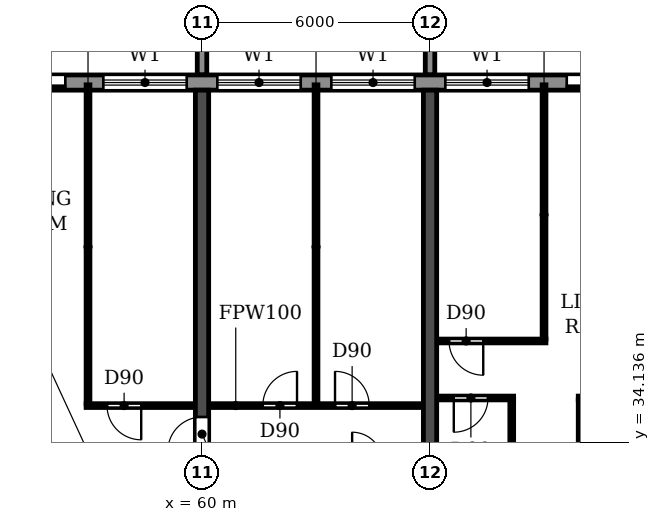
"""IFC4 building model, lengths in metres.
Left out: names, types, materials, properties, quantities, classifications, styles, units other than length and angle.
Written with IfcOpenShell. Run it as: python <this file> out.ifc"""

import sys

from ifc_helpers import new_model, si_unit, direction, frame, frame_2d, origin, place, context, subcontext, project, spatial, polyline, rectangle, outline, extrude, source, transform, mapped, element, fill, save


model = new_model("IFC4")
c1 = context("Model", 3, precision=1e-05, world=origin(), true_north=direction((0.0, 1.0)))
c2 = subcontext(c1, "Body", "Model", "MODEL_VIEW")
j1 = project(units=[si_unit("LENGTHUNIT", "METRE"), si_unit("PLANEANGLEUNIT", "RADIAN")], contexts=[c1])
p1 = place(None, origin())
s1 = spatial("IfcSite", under=j1, at=p1, CompositionType="ELEMENT")
p2 = place(p1, origin())
s2 = spatial("IfcBuilding", under=s1, at=p2, CompositionType="ELEMENT")
p3 = place(p2, frame((0.0, 0.0, 92.7)))
s3 = spatial("IfcBuildingStorey", under=s2, at=p3, CompositionType="ELEMENT", Elevation=92.7)
p4 = place(p3, frame((60.0, 30.525, 0.0), z_axis=(0.0, 0.0, 1.0), x_axis=(0.0, 1.0, 0.0)))
e1 = element("IfcWall", 1, at=p4, inside=s3, PredefinedType="SHEAR", context=c2, shape_type="SweptSolid", body=[
    extrude(rectangle(XDim=12.875, YDim=0.35, at=frame_2d((6.438, 0.0))), origin(), (0.0, 0.0, 1.0), 3.06),
])
p5 = place(p4, frame((3.375, 0.0, 0.0)))
e2 = element("IfcOpeningElement", 2, at=p5, cuts=e1, PredefinedType="OPENING", context=c2, shape_type="SweptSolid", body=[
    extrude(rectangle(XDim=0.9, YDim=2.1, at=frame_2d((0.45, 1.05))), frame((0.0, 0.185, 0.0), z_axis=(0.0, -1.0, 0.0), x_axis=(1.0, 0.0, 0.0)), (0.0, 0.0, 1.0), 0.37),
])
p6 = place(p3, frame((66.0, 30.525, 0.0), z_axis=(0.0, 0.0, 1.0), x_axis=(0.0, 1.0, 0.0)))
e3 = element("IfcWall", 3, at=p6, inside=s3, PredefinedType="SHEAR", context=c2, shape_type="SweptSolid", body=[
    extrude(rectangle(XDim=12.875, YDim=0.35, at=frame_2d((6.438, 0.0))), origin(), (0.0, 0.0, 1.0), 3.06),
])
p7 = place(p3, frame((91.317, 43.6, 0.0), z_axis=(0.0, 0.0, 1.0), x_axis=(-1.0, 0.0, 0.0)))
e4 = element("IfcWall", 4, at=p7, inside=s3, PredefinedType="STANDARD", context=c2, shape_type="SweptSolid", body=[
    extrude(rectangle(XDim=80.634, YDim=0.4, at=frame_2d((40.317, 0.0))), origin(), (0.0, 0.0, 1.0), 3.06),
])
p8 = place(p7, frame((76.717, 0.0, 0.9)))
e5 = element("IfcOpeningElement", 5, at=p8, cuts=e4, PredefinedType="OPENING", context=c2, shape_type="SweptSolid", body=[
    extrude(rectangle(XDim=2.2, YDim=1.5, at=frame_2d((1.1, 0.75))), frame((0.0, 0.21, 0.0), z_axis=(0.0, -1.0, 0.0), x_axis=(1.0, 0.0, 0.0)), (0.0, 0.0, 1.0), 0.42),
])
p9 = place(p7, frame((73.917, 0.0, 0.0)))
e6 = element("IfcOpeningElement", 6, at=p9, cuts=e4, PredefinedType="OPENING", context=c2, shape_type="SweptSolid", body=[
    extrude(rectangle(XDim=1.8, YDim=2.4, at=frame_2d((0.9, 1.2))), frame((0.0, 0.21, 0.0), z_axis=(0.0, -1.0, 0.0), x_axis=(1.0, 0.0, 0.0)), (0.0, 0.0, 1.0), 0.42),
])
p10 = place(p7, frame((70.717, 0.0, 0.9)))
e7 = element("IfcOpeningElement", 7, at=p10, cuts=e4, PredefinedType="OPENING", context=c2, shape_type="SweptSolid", body=[
    extrude(rectangle(XDim=2.2, YDim=1.5, at=frame_2d((1.1, 0.75))), frame((0.0, 0.21, 0.0), z_axis=(0.0, -1.0, 0.0), x_axis=(1.0, 0.0, 0.0)), (0.0, 0.0, 1.0), 0.42),
])
p11 = place(p7, frame((67.717, 0.0, 0.9)))
e8 = element("IfcOpeningElement", 8, at=p11, cuts=e4, PredefinedType="OPENING", context=c2, shape_type="SweptSolid", body=[
    extrude(rectangle(XDim=2.2, YDim=1.5, at=frame_2d((1.1, 0.75))), frame((0.0, 0.21, 0.0), z_axis=(0.0, -1.0, 0.0), x_axis=(1.0, 0.0, 0.0)), (0.0, 0.0, 1.0), 0.42),
])
p12 = place(p7, frame((64.717, 0.0, 0.9)))
e9 = element("IfcOpeningElement", 9, at=p12, cuts=e4, PredefinedType="OPENING", context=c2, shape_type="SweptSolid", body=[
    extrude(rectangle(XDim=2.2, YDim=1.5, at=frame_2d((1.1, 0.75))), frame((0.0, 0.21, 0.0), z_axis=(0.0, -1.0, 0.0), x_axis=(1.0, 0.0, 0.0)), (0.0, 0.0, 1.0), 0.42),
])
p13 = place(p7, frame((61.917, 0.0, 0.0)))
e10 = element("IfcOpeningElement", 10, at=p13, cuts=e4, PredefinedType="OPENING", context=c2, shape_type="SweptSolid", body=[
    extrude(rectangle(XDim=1.8, YDim=2.4, at=frame_2d((0.9, 1.2))), frame((0.0, 0.21, 0.0), z_axis=(0.0, -1.0, 0.0), x_axis=(1.0, 0.0, 0.0)), (0.0, 0.0, 1.0), 0.42),
])
p14 = place(p7, frame((58.717, 0.0, 0.9)))
e11 = element("IfcOpeningElement", 11, at=p14, cuts=e4, PredefinedType="OPENING", context=c2, shape_type="SweptSolid", body=[
    extrude(rectangle(XDim=2.2, YDim=1.5, at=frame_2d((1.1, 0.75))), frame((0.0, 0.21, 0.0), z_axis=(0.0, -1.0, 0.0), x_axis=(1.0, 0.0, 0.0)), (0.0, 0.0, 1.0), 0.42),
])
p15 = place(p7, frame((55.717, 0.0, 0.9)))
e12 = element("IfcOpeningElement", 12, at=p15, cuts=e4, PredefinedType="OPENING", context=c2, shape_type="SweptSolid", body=[
    extrude(rectangle(XDim=2.2, YDim=1.5, at=frame_2d((1.1, 0.75))), frame((0.0, 0.21, 0.0), z_axis=(0.0, -1.0, 0.0), x_axis=(1.0, 0.0, 0.0)), (0.0, 0.0, 1.0), 0.42),
])
p16 = place(p7, frame((52.917, 0.0, 0.0)))
e13 = element("IfcOpeningElement", 13, at=p16, cuts=e4, PredefinedType="OPENING", context=c2, shape_type="SweptSolid", body=[
    extrude(rectangle(XDim=1.8, YDim=2.4, at=frame_2d((0.9, 1.2))), frame((0.0, 0.21, 0.0), z_axis=(0.0, -1.0, 0.0), x_axis=(1.0, 0.0, 0.0)), (0.0, 0.0, 1.0), 0.42),
])
p17 = place(p7, frame((49.717, 0.0, 0.9)))
e14 = element("IfcOpeningElement", 14, at=p17, cuts=e4, PredefinedType="OPENING", context=c2, shape_type="SweptSolid", body=[
    extrude(rectangle(XDim=2.2, YDim=1.5, at=frame_2d((1.1, 0.75))), frame((0.0, 0.21, 0.0), z_axis=(0.0, -1.0, 0.0), x_axis=(1.0, 0.0, 0.0)), (0.0, 0.0, 1.0), 0.42),
])
p18 = place(p7, frame((46.717, 0.0, 0.9)))
e15 = element("IfcOpeningElement", 15, at=p18, cuts=e4, PredefinedType="OPENING", context=c2, shape_type="SweptSolid", body=[
    extrude(rectangle(XDim=2.2, YDim=1.5, at=frame_2d((1.1, 0.75))), frame((0.0, 0.21, 0.0), z_axis=(0.0, -1.0, 0.0), x_axis=(1.0, 0.0, 0.0)), (0.0, 0.0, 1.0), 0.42),
])
p19 = place(p7, frame((43.717, 0.0, 0.9)))
e16 = element("IfcOpeningElement", 16, at=p19, cuts=e4, PredefinedType="OPENING", context=c2, shape_type="SweptSolid", body=[
    extrude(rectangle(XDim=2.2, YDim=1.5, at=frame_2d((1.1, 0.75))), frame((0.0, 0.21, 0.0), z_axis=(0.0, -1.0, 0.0), x_axis=(1.0, 0.0, 0.0)), (0.0, 0.0, 1.0), 0.42),
])
p20 = place(p7, frame((40.717, 0.0, 0.9)))
e17 = element("IfcOpeningElement", 17, at=p20, cuts=e4, PredefinedType="OPENING", context=c2, shape_type="SweptSolid", body=[
    extrude(rectangle(XDim=2.2, YDim=1.5, at=frame_2d((1.1, 0.75))), frame((0.0, 0.21, 0.0), z_axis=(0.0, -1.0, 0.0), x_axis=(1.0, 0.0, 0.0)), (0.0, 0.0, 1.0), 0.42),
])
p21 = place(p7, frame((37.917, 0.0, 0.0)))
e18 = element("IfcOpeningElement", 18, at=p21, cuts=e4, PredefinedType="OPENING", context=c2, shape_type="SweptSolid", body=[
    extrude(rectangle(XDim=1.8, YDim=2.4, at=frame_2d((0.9, 1.2))), frame((0.0, 0.21, 0.0), z_axis=(0.0, -1.0, 0.0), x_axis=(1.0, 0.0, 0.0)), (0.0, 0.0, 1.0), 0.42),
])
p22 = place(p7, frame((34.917, 0.0, 0.0)))
e19 = element("IfcOpeningElement", 19, at=p22, cuts=e4, PredefinedType="OPENING", context=c2, shape_type="SweptSolid", body=[
    extrude(rectangle(XDim=1.8, YDim=2.4, at=frame_2d((0.9, 1.2))), frame((0.0, 0.21, 0.0), z_axis=(0.0, -1.0, 0.0), x_axis=(1.0, 0.0, 0.0)), (0.0, 0.0, 1.0), 0.42),
])
p23 = place(p7, frame((31.717, 0.0, 0.9)))
e20 = element("IfcOpeningElement", 20, at=p23, cuts=e4, PredefinedType="OPENING", context=c2, shape_type="SweptSolid", body=[
    extrude(rectangle(XDim=2.2, YDim=1.5, at=frame_2d((1.1, 0.75))), frame((0.0, 0.21, 0.0), z_axis=(0.0, -1.0, 0.0), x_axis=(1.0, 0.0, 0.0)), (0.0, 0.0, 1.0), 0.42),
])
p24 = place(p7, frame((28.717, 0.0, 0.9)))
e21 = element("IfcOpeningElement", 21, at=p24, cuts=e4, PredefinedType="OPENING", context=c2, shape_type="SweptSolid", body=[
    extrude(rectangle(XDim=2.2, YDim=1.5, at=frame_2d((1.1, 0.75))), frame((0.0, 0.21, 0.0), z_axis=(0.0, -1.0, 0.0), x_axis=(1.0, 0.0, 0.0)), (0.0, 0.0, 1.0), 0.42),
])
p25 = place(p7, frame((25.717, 0.0, 0.9)))
e22 = element("IfcOpeningElement", 22, at=p25, cuts=e4, PredefinedType="OPENING", context=c2, shape_type="SweptSolid", body=[
    extrude(rectangle(XDim=2.2, YDim=1.5, at=frame_2d((1.1, 0.75))), frame((0.0, 0.21, 0.0), z_axis=(0.0, -1.0, 0.0), x_axis=(1.0, 0.0, 0.0)), (0.0, 0.0, 1.0), 0.42),
])
p26 = place(p7, frame((22.717, 0.0, 0.9)))
e23 = element("IfcOpeningElement", 23, at=p26, cuts=e4, PredefinedType="OPENING", context=c2, shape_type="SweptSolid", body=[
    extrude(rectangle(XDim=2.2, YDim=1.5, at=frame_2d((1.1, 0.75))), frame((0.0, 0.21, 0.0), z_axis=(0.0, -1.0, 0.0), x_axis=(1.0, 0.0, 0.0)), (0.0, 0.0, 1.0), 0.42),
])
p27 = place(p7, frame((19.917, 0.0, 0.0)))
e24 = element("IfcOpeningElement", 24, at=p27, cuts=e4, PredefinedType="OPENING", context=c2, shape_type="SweptSolid", body=[
    extrude(rectangle(XDim=1.8, YDim=2.4, at=frame_2d((0.9, 1.2))), frame((0.0, 0.21, 0.0), z_axis=(0.0, -1.0, 0.0), x_axis=(1.0, 0.0, 0.0)), (0.0, 0.0, 1.0), 0.42),
])
p28 = place(p7, frame((16.717, 0.0, 0.9)))
e25 = element("IfcOpeningElement", 25, at=p28, cuts=e4, PredefinedType="OPENING", context=c2, shape_type="SweptSolid", body=[
    extrude(rectangle(XDim=2.2, YDim=1.5, at=frame_2d((1.1, 0.75))), frame((0.0, 0.21, 0.0), z_axis=(0.0, -1.0, 0.0), x_axis=(1.0, 0.0, 0.0)), (0.0, 0.0, 1.0), 0.42),
])
p29 = place(p7, frame((13.917, 0.0, 0.0)))
e26 = element("IfcOpeningElement", 26, at=p29, cuts=e4, PredefinedType="OPENING", context=c2, shape_type="SweptSolid", body=[
    extrude(rectangle(XDim=1.8, YDim=2.4, at=frame_2d((0.9, 1.2))), frame((0.0, 0.21, 0.0), z_axis=(0.0, -1.0, 0.0), x_axis=(1.0, 0.0, 0.0)), (0.0, 0.0, 1.0), 0.42),
])
p30 = place(p7, frame((10.717, 0.0, 0.9)))
e27 = element("IfcOpeningElement", 27, at=p30, cuts=e4, PredefinedType="OPENING", context=c2, shape_type="SweptSolid", body=[
    extrude(rectangle(XDim=2.2, YDim=1.5, at=frame_2d((1.1, 0.75))), frame((0.0, 0.21, 0.0), z_axis=(0.0, -1.0, 0.0), x_axis=(1.0, 0.0, 0.0)), (0.0, 0.0, 1.0), 0.42),
])
p31 = place(p7, frame((7.917, 0.0, 0.0)))
e28 = element("IfcOpeningElement", 28, at=p31, cuts=e4, PredefinedType="OPENING", context=c2, shape_type="SweptSolid", body=[
    extrude(rectangle(XDim=1.8, YDim=2.4, at=frame_2d((0.9, 1.2))), frame((0.0, 0.21, 0.0), z_axis=(0.0, -1.0, 0.0), x_axis=(1.0, 0.0, 0.0)), (0.0, 0.0, 1.0), 0.42),
])
p32 = place(p7, frame((4.717, 0.0, 0.9)))
e29 = element("IfcOpeningElement", 29, at=p32, cuts=e4, PredefinedType="OPENING", context=c2, shape_type="SweptSolid", body=[
    extrude(rectangle(XDim=2.2, YDim=1.5, at=frame_2d((1.1, 0.75))), frame((0.0, 0.21, 0.0), z_axis=(0.0, -1.0, 0.0), x_axis=(1.0, 0.0, 0.0)), (0.0, 0.0, 1.0), 0.42),
])
p33 = place(p7, frame((1.917, 0.0, 0.0)))
e30 = element("IfcOpeningElement", 30, at=p33, cuts=e4, PredefinedType="OPENING", context=c2, shape_type="SweptSolid", body=[
    extrude(rectangle(XDim=1.8, YDim=2.4, at=frame_2d((0.9, 1.2))), frame((0.0, 0.21, 0.0), z_axis=(0.0, -1.0, 0.0), x_axis=(1.0, 0.0, 0.0)), (0.0, 0.0, 1.0), 0.42),
])
m1 = source(origin(), c2, "Body", "SweptSolid", [
    extrude(outline(polyline([(0.0, 0.0), (0.25, 0.0), (0.25, 3.1), (0.0, 3.1), (0.0, 0.0)])), origin(), (0.0, 0.0, 1.0), 3.1),
])
for number, where in (
    (31, (59.875, 43.8, 0.0)),
    (32, (65.875, 43.8, 0.0)),
):
    element("IfcWall", number, at=place(p3, frame(where)), inside=s3, PredefinedType="STANDARD", context=c2, shape_type="MappedRepresentation", body=[
        mapped(m1, transform((0.0, 0.0, 0.0))),
    ])
p34 = place(p3, frame((56.95, 35.1, 0.0), z_axis=(0.0, 0.0, 1.0), x_axis=(1.0, 0.0, 0.0)))
e33 = element("IfcWall", 33, at=p34, inside=s3, PredefinedType="PARTITIONING", context=c2, shape_type="SweptSolid", body=[
    extrude(rectangle(XDim=2.865, YDim=0.1, at=frame_2d((1.433, 0.0))), origin(), (0.0, 0.0, 1.0), 3.06),
])
p35 = place(p34, frame((0.55, 0.0, 0.0)))
e34 = element("IfcOpeningElement", 34, at=p35, cuts=e33, PredefinedType="OPENING", context=c2, shape_type="SweptSolid", body=[
    extrude(rectangle(XDim=0.9, YDim=2.1, at=frame_2d((0.45, 1.05))), frame((0.0, 0.06, 0.0), z_axis=(0.0, -1.0, 0.0), x_axis=(1.0, 0.0, 0.0)), (0.0, 0.0, 1.0), 0.12),
])
p36 = place(p3, frame((60.185, 35.1, 0.0), z_axis=(0.0, 0.0, 1.0), x_axis=(1.0, 0.0, 0.0)))
e35 = element("IfcWall", 35, at=p36, inside=s3, PredefinedType="PARTITIONING", context=c2, shape_type="SweptSolid", body=[
    extrude(rectangle(XDim=5.63, YDim=0.1, at=frame_2d((2.815, 0.0))), origin(), (0.0, 0.0, 1.0), 3.06),
])
p37 = place(p36, frame((1.415, 0.0, 0.0)))
e36 = element("IfcOpeningElement", 36, at=p37, cuts=e35, PredefinedType="OPENING", context=c2, shape_type="SweptSolid", body=[
    extrude(rectangle(XDim=0.9, YDim=2.1, at=frame_2d((0.45, 1.05))), frame((0.0, 0.06, 0.0), z_axis=(0.0, -1.0, 0.0), x_axis=(1.0, 0.0, 0.0)), (0.0, 0.0, 1.0), 0.12),
])
p38 = place(p36, frame((3.315, 0.0, 0.0)))
e37 = element("IfcOpeningElement", 37, at=p38, cuts=e35, PredefinedType="OPENING", context=c2, shape_type="SweptSolid", body=[
    extrude(rectangle(XDim=0.9, YDim=2.1, at=frame_2d((0.45, 1.05))), frame((0.0, 0.06, 0.0), z_axis=(0.0, -1.0, 0.0), x_axis=(1.0, 0.0, 0.0)), (0.0, 0.0, 1.0), 0.12),
])
p39 = place(p3, frame((66.185, 35.3, 0.0), z_axis=(0.0, 0.0, 1.0), x_axis=(1.0, 0.0, 0.0)))
e38 = element("IfcWall", 38, at=p39, inside=s3, PredefinedType="PARTITIONING", context=c2, shape_type="SweptSolid", body=[
    extrude(rectangle(XDim=2.015, YDim=0.1, at=frame_2d((1.007, 0.0))), origin(), (0.0, 0.0, 1.0), 3.06),
])
p40 = place(p39, frame((0.44, 0.0, 0.0)))
e39 = element("IfcOpeningElement", 39, at=p40, cuts=e38, PredefinedType="OPENING", context=c2, shape_type="SweptSolid", body=[
    extrude(rectangle(XDim=0.9, YDim=2.1, at=frame_2d((0.45, 1.05))), frame((0.0, 0.06, 0.0), z_axis=(0.0, -1.0, 0.0), x_axis=(1.0, 0.0, 0.0)), (0.0, 0.0, 1.0), 0.12),
])
p41 = place(p3, frame((69.9, 35.3, 0.0), z_axis=(0.0, 0.0, 1.0), x_axis=(1.0, 0.0, 0.0)))
e40 = element("IfcWall", 40, at=p41, inside=s3, PredefinedType="PARTITIONING", context=c2, shape_type="SweptSolid", body=[
    extrude(rectangle(XDim=1.915, YDim=0.1, at=frame_2d((0.958, 0.0))), origin(), (0.0, 0.0, 1.0), 3.06),
])
p42 = place(p41, frame((0.675, 0.0, 0.0)))
e41 = element("IfcOpeningElement", 41, at=p42, cuts=e40, PredefinedType="OPENING", context=c2, shape_type="SweptSolid", body=[
    extrude(rectangle(XDim=0.8, YDim=2.1, at=frame_2d((0.4, 1.05))), frame((0.0, 0.06, 0.0), z_axis=(0.0, -1.0, 0.0), x_axis=(1.0, 0.0, 0.0)), (0.0, 0.0, 1.0), 0.12),
])
p43 = place(p3, frame((66.185, 36.8, 0.0), z_axis=(0.0, 0.0, 1.0), x_axis=(1.0, 0.0, 0.0)))
e42 = element("IfcWall", 42, at=p43, inside=s3, PredefinedType="PARTITIONING", context=c2, shape_type="SweptSolid", body=[
    extrude(rectangle(XDim=2.865, YDim=0.1, at=frame_2d((1.433, 0.0))), origin(), (0.0, 0.0, 1.0), 3.06),
])
p44 = place(p43, frame((0.315, 0.0, 0.0)))
e43 = element("IfcOpeningElement", 43, at=p44, cuts=e42, PredefinedType="OPENING", context=c2, shape_type="SweptSolid", body=[
    extrude(rectangle(XDim=0.9, YDim=2.1, at=frame_2d((0.45, 1.05))), frame((0.0, 0.06, 0.0), z_axis=(0.0, -1.0, 0.0), x_axis=(1.0, 0.0, 0.0)), (0.0, 0.0, 1.0), 0.12),
])
for number, where, z_axis, x_axis in (
    (44, (57.0, 35.15, 0.0), (0.0, 0.0, 1.0), (0.0, 1.0, 0.0)),
    (45, (63.0, 35.15, 0.0), (0.0, 0.0, 1.0), (0.0, 1.0, 0.0)),
):
    element("IfcWall", number, at=place(p3, frame(where, z_axis=z_axis, x_axis=x_axis)), inside=s3, PredefinedType="PARTITIONING", context=c2, shape_type="SweptSolid", body=[
        extrude(rectangle(XDim=8.39, YDim=0.1, at=frame_2d((4.195, 0.0))), origin(), (0.0, 0.0, 1.0), 3.06),
    ])
p45 = place(p3, frame((68.15, 30.535, 0.0), z_axis=(0.0, 0.0, 1.0), x_axis=(0.0, 1.0, 0.0)))
e46 = element("IfcWall", 46, at=p45, inside=s3, PredefinedType="PARTITIONING", context=c2, shape_type="SweptSolid", body=[
    extrude(rectangle(XDim=4.715, YDim=0.1, at=frame_2d((2.357, 0.0))), origin(), (0.0, 0.0, 1.0), 3.06),
])
p46 = place(p3, frame((69.0, 36.85, 0.0), z_axis=(0.0, 0.0, 1.0), x_axis=(0.0, 1.0, 0.0)))
e47 = element("IfcWall", 47, at=p46, inside=s3, PredefinedType="PARTITIONING", context=c2, shape_type="SweptSolid", body=[
    extrude(rectangle(XDim=6.69, YDim=0.1, at=frame_2d((3.345, 0.0))), origin(), (0.0, 0.0, 1.0), 3.06),
])
p47 = place(p3, frame((69.95, 30.535, 0.0), z_axis=(0.0, 0.0, 1.0), x_axis=(0.0, 1.0, 0.0)))
e48 = element("IfcWall", 48, at=p47, inside=s3, PredefinedType="PARTITIONING", context=c2, shape_type="SweptSolid", body=[
    extrude(rectangle(XDim=4.715, YDim=0.1, at=frame_2d((2.357, 0.0))), origin(), (0.0, 0.0, 1.0), 3.06),
])
p48 = place(p22, origin())
e49 = element("IfcDoor", 49, at=p48, inside=s3, OperationType="DOUBLE_DOOR_SLIDING", PredefinedType="DOOR", context=c2, shape_type="SweptSolid", body=[
    extrude(rectangle(XDim=1.8, YDim=2.4, at=frame_2d((0.9, 1.2))), frame((0.0, 0.025, 0.0), z_axis=(0.0, -1.0, 0.0), x_axis=(1.0, 0.0, 0.0)), (0.0, 0.0, 1.0), 0.05),
])
fill(e19, e49)
p49 = place(p23, origin())
e50 = element("IfcWindow", 50, at=p49, inside=s3, PartitioningType="DOUBLE_PANEL_HORIZONTAL", PredefinedType="WINDOW", context=c2, shape_type="SweptSolid", body=[
    extrude(rectangle(XDim=2.2, YDim=1.5, at=frame_2d((1.1, 0.75))), frame((0.0, 0.03, 0.0), z_axis=(0.0, -1.0, 0.0), x_axis=(1.0, 0.0, 0.0)), (0.0, 0.0, 1.0), 0.06),
])
fill(e20, e50)
p50 = place(p24, origin())
e51 = element("IfcWindow", 51, at=p50, inside=s3, PartitioningType="DOUBLE_PANEL_HORIZONTAL", PredefinedType="WINDOW", context=c2, shape_type="SweptSolid", body=[
    extrude(rectangle(XDim=2.2, YDim=1.5, at=frame_2d((1.1, 0.75))), frame((0.0, 0.03, 0.0), z_axis=(0.0, -1.0, 0.0), x_axis=(1.0, 0.0, 0.0)), (0.0, 0.0, 1.0), 0.06),
])
fill(e21, e51)
p51 = place(p25, origin())
e52 = element("IfcWindow", 52, at=p51, inside=s3, PartitioningType="DOUBLE_PANEL_HORIZONTAL", PredefinedType="WINDOW", context=c2, shape_type="SweptSolid", body=[
    extrude(rectangle(XDim=2.2, YDim=1.5, at=frame_2d((1.1, 0.75))), frame((0.0, 0.03, 0.0), z_axis=(0.0, -1.0, 0.0), x_axis=(1.0, 0.0, 0.0)), (0.0, 0.0, 1.0), 0.06),
])
fill(e22, e52)
p52 = place(p26, origin())
e53 = element("IfcWindow", 53, at=p52, inside=s3, PartitioningType="DOUBLE_PANEL_HORIZONTAL", PredefinedType="WINDOW", context=c2, shape_type="SweptSolid", body=[
    extrude(rectangle(XDim=2.2, YDim=1.5, at=frame_2d((1.1, 0.75))), frame((0.0, 0.03, 0.0), z_axis=(0.0, -1.0, 0.0), x_axis=(1.0, 0.0, 0.0)), (0.0, 0.0, 1.0), 0.06),
])
fill(e23, e53)
p53 = place(p27, origin())
e54 = element("IfcDoor", 54, at=p53, inside=s3, OperationType="DOUBLE_DOOR_SLIDING", PredefinedType="DOOR", context=c2, shape_type="SweptSolid", body=[
    extrude(rectangle(XDim=1.8, YDim=2.4, at=frame_2d((0.9, 1.2))), frame((0.0, 0.025, 0.0), z_axis=(0.0, -1.0, 0.0), x_axis=(1.0, 0.0, 0.0)), (0.0, 0.0, 1.0), 0.05),
])
fill(e24, e54)
p54 = place(p37, origin())
e55 = element("IfcDoor", 55, at=p54, inside=s3, OperationType="SINGLE_SWING_RIGHT", PredefinedType="DOOR", context=c2, shape_type="SweptSolid", body=[
    extrude(rectangle(XDim=0.9, YDim=2.1, at=frame_2d((0.45, 1.05))), frame((0.0, 0.025, 0.0), z_axis=(0.0, -1.0, 0.0), x_axis=(1.0, 0.0, 0.0)), (0.0, 0.0, 1.0), 0.05),
])
fill(e36, e55)
p55 = place(p38, origin())
e56 = element("IfcDoor", 56, at=p55, inside=s3, OperationType="SINGLE_SWING_LEFT", PredefinedType="DOOR", context=c2, shape_type="SweptSolid", body=[
    extrude(rectangle(XDim=0.9, YDim=2.1, at=frame_2d((0.45, 1.05))), frame((0.0, 0.025, 0.0), z_axis=(0.0, -1.0, 0.0), x_axis=(1.0, 0.0, 0.0)), (0.0, 0.0, 1.0), 0.05),
])
fill(e37, e56)
p56 = place(p35, frame((0.9, 0.0, 0.0), z_axis=(0.0, 0.0, 1.0), x_axis=(-1.0, 0.0, 0.0)))
e57 = element("IfcDoor", 57, at=p56, inside=s3, OperationType="SINGLE_SWING_LEFT", PredefinedType="DOOR", context=c2, shape_type="SweptSolid", body=[
    extrude(rectangle(XDim=0.9, YDim=2.1, at=frame_2d((0.45, 1.05))), frame((0.0, 0.025, 0.0), z_axis=(0.0, -1.0, 0.0), x_axis=(1.0, 0.0, 0.0)), (0.0, 0.0, 1.0), 0.05),
])
fill(e34, e57)
p57 = place(p5, origin())
e58 = element("IfcDoor", 58, at=p57, inside=s3, OperationType="SINGLE_SWING_LEFT", PredefinedType="DOOR", context=c2, shape_type="SweptSolid", body=[
    extrude(rectangle(XDim=0.9, YDim=2.1, at=frame_2d((0.45, 1.05))), frame((0.0, 0.025, 0.0), z_axis=(0.0, -1.0, 0.0), x_axis=(1.0, 0.0, 0.0)), (0.0, 0.0, 1.0), 0.05),
])
fill(e2, e58)
p58 = place(p44, frame((0.9, 0.0, 0.0), z_axis=(0.0, 0.0, 1.0), x_axis=(-1.0, 0.0, 0.0)))
e59 = element("IfcDoor", 59, at=p58, inside=s3, OperationType="SINGLE_SWING_LEFT", PredefinedType="DOOR", context=c2, shape_type="SweptSolid", body=[
    extrude(rectangle(XDim=0.9, YDim=2.1, at=frame_2d((0.45, 1.05))), frame((0.0, 0.025, 0.0), z_axis=(0.0, -1.0, 0.0), x_axis=(1.0, 0.0, 0.0)), (0.0, 0.0, 1.0), 0.05),
])
fill(e43, e59)
p59 = place(p40, frame((0.9, 0.0, 0.0), z_axis=(0.0, 0.0, 1.0), x_axis=(-1.0, 0.0, 0.0)))
e60 = element("IfcDoor", 60, at=p59, inside=s3, OperationType="SINGLE_SWING_RIGHT", PredefinedType="DOOR", context=c2, shape_type="SweptSolid", body=[
    extrude(rectangle(XDim=0.9, YDim=2.1, at=frame_2d((0.45, 1.05))), frame((0.0, 0.025, 0.0), z_axis=(0.0, -1.0, 0.0), x_axis=(1.0, 0.0, 0.0)), (0.0, 0.0, 1.0), 0.05),
])
fill(e39, e60)
save(model, sys.argv[1])
